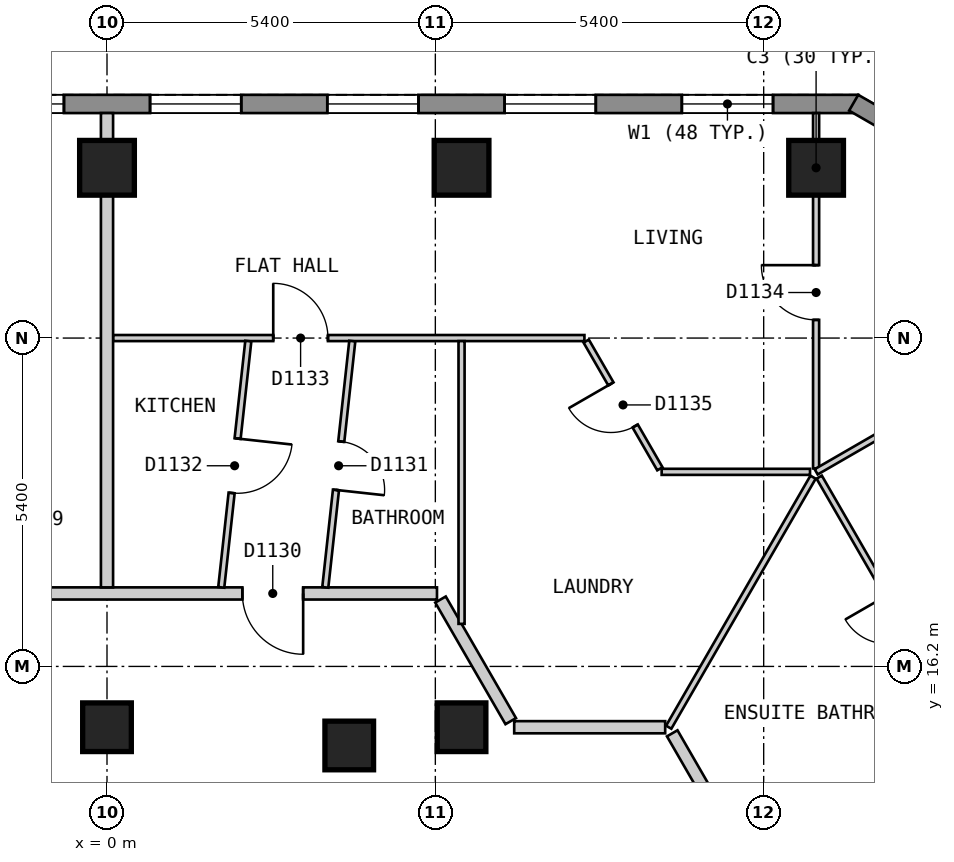
"""IFC4 building model, lengths in metres.
Left out: names, types, materials, properties, quantities, classifications, styles, units other than length and angle.
Written with IfcOpenShell. Run it as: python <this file> out.ifc"""

import sys

from ifc_helpers import new_model, si_unit, direction, frame, frame_2d, origin, origin_2d, place, context, subcontext, project, spatial, polyline, rectangle, outline, extrude, element, fill, save


model = new_model("IFC4")
c1 = context("Model", 3, precision=1e-05, world=origin(), true_north=direction((0.0, 1.0)))
c2 = subcontext(c1, "Body", "Model", "MODEL_VIEW")
j1 = project(units=[si_unit("LENGTHUNIT", "METRE"), si_unit("PLANEANGLEUNIT", "RADIAN")], contexts=[c1])
p1 = place(None, origin())
s1 = spatial("IfcSite", under=j1, at=p1, CompositionType="ELEMENT")
p2 = place(p1, origin())
s2 = spatial("IfcBuilding", under=s1, at=p2, CompositionType="ELEMENT")
p3 = place(p2, frame((0.0, 0.0, 138.6)))
s3 = spatial("IfcBuildingStorey", under=s2, at=p3, CompositionType="ELEMENT", Elevation=138.6)
for number, where, z_axis, x_axis in (
    (1, (11.662, 24.4, 0.0), (0.0, 0.0, 1.0), (-1.0, 0.0, 0.0)),
    (2, (5.831, 24.4, 0.0), (0.0, 0.0, 1.0), (-1.0, 0.0, 0.0)),
    (3, (0.0, 24.4, 0.0), (0.0, 0.0, 1.0), (-1.0, 0.0, 0.0)),
):
    element("IfcColumn", number, at=place(p3, frame(where, z_axis=z_axis, x_axis=x_axis)), inside=s3, PredefinedType="COLUMN", context=c2, shape_type="SweptSolid", body=[
        extrude(rectangle(XDim=0.9, YDim=0.9, at=origin_2d()), origin(), (0.0, 0.0, 1.0), 3.0),
    ])
for number, where, z_axis, x_axis in (
    (4, (5.831, 15.2, 0.0), (0.0, 0.0, 1.0), (-1.0, 0.0, 0.0)),
    (5, (3.984, 14.9, 0.0), (0.0, 0.0, 1.0), (1.0, 0.0, 0.0)),
    (6, (0.0, 15.2, 0.0), (0.0, 0.0, 1.0), (-1.0, 0.0, 0.0)),
):
    element("IfcColumn", number, at=place(p3, frame(where, z_axis=z_axis, x_axis=x_axis)), inside=s3, PredefinedType="COLUMN", context=c2, shape_type="SweptSolid", body=[
        extrude(rectangle(XDim=0.8, YDim=0.8, at=origin_2d()), origin(), (0.0, 0.0, 1.0), 3.0),
    ])
p4 = place(p3, frame((12.355, 25.45, 0.0), z_axis=(0.0, 0.0, 1.0), x_axis=(-1.0, 0.0, 0.0)))
e7 = element("IfcWall", 7, at=p4, inside=s3, PredefinedType="SOLIDWALL", context=c2, shape_type="SweptSolid", body=[
    extrude(outline(polyline([(0.0, -0.15), (24.71, -0.15), (24.63, 0.15), (0.08, 0.15), (0.0, -0.15)])), origin(), (0.0, 0.0, 1.0), 2.7),
])
p5 = place(p4, frame((1.401, 0.0, 0.15)))
e8 = element("IfcOpeningElement", 8, at=p5, cuts=e7, PredefinedType="OPENING", context=c2, shape_type="SweptSolid", body=[
    extrude(rectangle(XDim=1.5, YDim=2.1, at=frame_2d((0.75, 1.05))), frame((0.0, 0.16, 0.0), z_axis=(0.0, -1.0, 0.0), x_axis=(1.0, 0.0, 0.0)), (0.0, 0.0, 1.0), 0.32),
])
p6 = place(p4, frame((4.316, 0.0, 0.15)))
e9 = element("IfcOpeningElement", 9, at=p6, cuts=e7, PredefinedType="OPENING", context=c2, shape_type="SweptSolid", body=[
    extrude(rectangle(XDim=1.5, YDim=2.1, at=frame_2d((0.75, 1.05))), frame((0.0, 0.16, 0.0), z_axis=(0.0, -1.0, 0.0), x_axis=(1.0, 0.0, 0.0)), (0.0, 0.0, 1.0), 0.32),
])
p7 = place(p4, frame((7.232, 0.0, 0.15)))
e10 = element("IfcOpeningElement", 10, at=p7, cuts=e7, PredefinedType="OPENING", context=c2, shape_type="SweptSolid", body=[
    extrude(rectangle(XDim=1.5, YDim=2.1, at=frame_2d((0.75, 1.05))), frame((0.0, 0.16, 0.0), z_axis=(0.0, -1.0, 0.0), x_axis=(1.0, 0.0, 0.0)), (0.0, 0.0, 1.0), 0.32),
])
p8 = place(p4, frame((10.147, 0.0, 0.15)))
e11 = element("IfcOpeningElement", 11, at=p8, cuts=e7, PredefinedType="OPENING", context=c2, shape_type="SweptSolid", body=[
    extrude(rectangle(XDim=1.5, YDim=2.1, at=frame_2d((0.75, 1.05))), frame((0.0, 0.16, 0.0), z_axis=(0.0, -1.0, 0.0), x_axis=(1.0, 0.0, 0.0)), (0.0, 0.0, 1.0), 0.32),
])
p9 = place(p4, frame((13.063, 0.0, 0.15)))
e12 = element("IfcOpeningElement", 12, at=p9, cuts=e7, PredefinedType="OPENING", context=c2, shape_type="SweptSolid", body=[
    extrude(rectangle(XDim=1.5, YDim=2.1, at=frame_2d((0.75, 1.05))), frame((0.0, 0.16, 0.0), z_axis=(0.0, -1.0, 0.0), x_axis=(1.0, 0.0, 0.0)), (0.0, 0.0, 1.0), 0.32),
])
p10 = place(p4, frame((15.978, 0.0, 0.15)))
e13 = element("IfcOpeningElement", 13, at=p10, cuts=e7, PredefinedType="OPENING", context=c2, shape_type="SweptSolid", body=[
    extrude(rectangle(XDim=1.5, YDim=2.1, at=frame_2d((0.75, 1.05))), frame((0.0, 0.16, 0.0), z_axis=(0.0, -1.0, 0.0), x_axis=(1.0, 0.0, 0.0)), (0.0, 0.0, 1.0), 0.32),
])
p11 = place(p4, frame((18.894, 0.0, 0.15)))
e14 = element("IfcOpeningElement", 14, at=p11, cuts=e7, PredefinedType="OPENING", context=c2, shape_type="SweptSolid", body=[
    extrude(rectangle(XDim=1.5, YDim=2.1, at=frame_2d((0.75, 1.05))), frame((0.0, 0.16, 0.0), z_axis=(0.0, -1.0, 0.0), x_axis=(1.0, 0.0, 0.0)), (0.0, 0.0, 1.0), 0.32),
])
p12 = place(p4, frame((21.809, 0.0, 0.15)))
e15 = element("IfcOpeningElement", 15, at=p12, cuts=e7, PredefinedType="OPENING", context=c2, shape_type="SweptSolid", body=[
    extrude(rectangle(XDim=1.5, YDim=2.1, at=frame_2d((0.75, 1.05))), frame((0.0, 0.16, 0.0), z_axis=(0.0, -1.0, 0.0), x_axis=(1.0, 0.0, 0.0)), (0.0, 0.0, 1.0), 0.32),
])
p13 = place(p3, frame((16.61, 22.97, 0.0), z_axis=(0.0, 0.0, 1.0), x_axis=(-0.866022959057, 0.500004234368, 0.0)))
e16 = element("IfcWall", 16, at=p13, inside=s3, PredefinedType="SOLIDWALL", context=c2, shape_type="SweptSolid", body=[
    extrude(outline(polyline([(0.0, -0.15), (5.0, -0.15), (4.92, 0.15), (0.08, 0.15), (0.0, -0.15)])), origin(), (0.0, 0.0, 1.0), 2.7),
])
p14 = place(p13, frame((0.65, 0.0, 0.15)))
e17 = element("IfcOpeningElement", 17, at=p14, cuts=e16, PredefinedType="OPENING", context=c2, shape_type="SweptSolid", body=[
    extrude(rectangle(XDim=1.2, YDim=2.1, at=frame_2d((0.6, 1.05))), frame((0.0, 0.16, 0.0), z_axis=(0.0, -1.0, 0.0), x_axis=(1.0, 0.0, 0.0)), (0.0, 0.0, 1.0), 0.32),
])
p15 = place(p13, frame((3.15, 0.0, 0.15)))
e18 = element("IfcOpeningElement", 18, at=p15, cuts=e16, PredefinedType="OPENING", context=c2, shape_type="SweptSolid", body=[
    extrude(rectangle(XDim=1.2, YDim=2.1, at=frame_2d((0.6, 1.05))), frame((0.0, 0.16, 0.0), z_axis=(0.0, -1.0, 0.0), x_axis=(1.0, 0.0, 0.0)), (0.0, 0.0, 1.0), 0.32),
])
p16 = place(p3, frame((5.485, 17.3, 0.0), z_axis=(0.0, 0.0, 1.0), x_axis=(0.500027479704, -0.866009537788, 0.0)))
e19 = element("IfcWall", 19, at=p16, inside=s3, PredefinedType="PARTITIONING", context=c2, shape_type="SweptSolid", body=[
    extrude(rectangle(XDim=2.309, YDim=0.2, at=frame_2d((1.155, 0.0))), origin(), (0.0, 0.0, 1.0), 2.7),
])
p17 = place(p3, frame((9.296, 15.1, 0.0), z_axis=(0.0, 0.0, 1.0), x_axis=(0.499974024244, -0.866040400375, 0.0)))
e20 = element("IfcWall", 20, at=p17, inside=s3, PredefinedType="PARTITIONING", context=c2, shape_type="SweptSolid", body=[
    extrude(rectangle(XDim=16.857, YDim=0.2, at=frame_2d((8.429, 0.0))), origin(), (0.0, 0.0, 1.0), 2.7),
])
p18 = place(p17, frame((11.522, 0.0, 0.0)))
e21 = element("IfcOpeningElement", 21, at=p18, cuts=e20, PredefinedType="OPENING", context=c2, shape_type="SweptSolid", body=[
    extrude(rectangle(XDim=1.0, YDim=2.1, at=frame_2d((0.5, 1.05))), frame((0.0, 0.11, 0.0), z_axis=(0.0, -1.0, 0.0), x_axis=(1.0, 0.0, 0.0)), (0.0, 0.0, 1.0), 0.22),
])
p19 = place(p3, frame((6.697, 15.2, 0.0), z_axis=(0.0, 0.0, 1.0), x_axis=(1.0, 0.0, 0.0)))
e22 = element("IfcWall", 22, at=p19, inside=s3, PredefinedType="PARTITIONING", context=c2, shape_type="SweptSolid", body=[
    extrude(rectangle(XDim=2.483, YDim=0.2, at=frame_2d((1.241, 0.0))), origin(), (0.0, 0.0, 1.0), 2.7),
])
p20 = place(p3, frame((-5.312, 17.4, 0.0), z_axis=(0.0, 0.0, 1.0), x_axis=(1.0, 0.0, 0.0)))
e23 = element("IfcWall", 23, at=p20, inside=s3, PredefinedType="PARTITIONING", context=c2, shape_type="SweptSolid", body=[
    extrude(rectangle(XDim=10.739, YDim=0.2, at=frame_2d((5.37, 0.0))), origin(), (0.0, 0.0, 1.0), 2.7),
])
p21 = place(p20, frame((7.538, 0.0, 0.0)))
e24 = element("IfcOpeningElement", 24, at=p21, cuts=e23, PredefinedType="OPENING", context=c2, shape_type="SweptSolid", body=[
    extrude(rectangle(XDim=1.0, YDim=2.1, at=frame_2d((0.5, 1.05))), frame((0.0, 0.11, 0.0), z_axis=(0.0, -1.0, 0.0), x_axis=(1.0, 0.0, 0.0)), (0.0, 0.0, 1.0), 0.22),
])
p22 = place(p20, frame((1.864, 0.0, 0.0)))
e25 = element("IfcOpeningElement", 25, at=p22, cuts=e23, PredefinedType="OPENING", context=c2, shape_type="SweptSolid", body=[
    extrude(rectangle(XDim=1.0, YDim=2.1, at=frame_2d((0.5, 1.05))), frame((0.0, 0.11, 0.0), z_axis=(0.0, -1.0, 0.0), x_axis=(1.0, 0.0, 0.0)), (0.0, 0.0, 1.0), 0.22),
])
p23 = place(p3, frame((7.881, 21.55, 0.0), z_axis=(0.0, 0.0, 1.0), x_axis=(0.499821239653, -0.866128586522, 0.0)))
e26 = element("IfcWall", 26, at=p23, inside=s3, PredefinedType="PARTITIONING", context=c2, shape_type="SweptSolid", body=[
    extrude(rectangle(XDim=2.425, YDim=0.1, at=frame_2d((1.212, 0.0))), origin(), (0.0, 0.0, 1.0), 2.7),
])
p24 = place(p23, frame((0.812, 0.0, 0.0)))
e27 = element("IfcOpeningElement", 27, at=p24, cuts=e26, PredefinedType="OPENING", context=c2, shape_type="SweptSolid", body=[
    extrude(rectangle(XDim=0.8, YDim=2.1, at=frame_2d((0.4, 1.05))), frame((0.0, 0.06, 0.0), z_axis=(0.0, -1.0, 0.0), x_axis=(1.0, 0.0, 0.0)), (0.0, 0.0, 1.0), 0.12),
])
p25 = place(p3, frame((11.713, 19.313, 0.0), z_axis=(0.0, 0.0, 1.0), x_axis=(0.499945064984, -0.866057118208, 0.0)))
e28 = element("IfcWall", 28, at=p25, inside=s3, PredefinedType="PARTITIONING", context=c2, shape_type="SweptSolid", body=[
    extrude(rectangle(XDim=5.285, YDim=0.1, at=frame_2d((2.642, 0.0))), origin(), (0.0, 0.0, 1.0), 2.7),
])
p26 = place(p25, frame((2.242, 0.0, 0.0)))
e29 = element("IfcOpeningElement", 29, at=p26, cuts=e28, PredefinedType="OPENING", context=c2, shape_type="SweptSolid", body=[
    extrude(rectangle(XDim=0.8, YDim=2.1, at=frame_2d((0.4, 1.05))), frame((0.0, 0.06, 0.0), z_axis=(0.0, -1.0, 0.0), x_axis=(1.0, 0.0, 0.0)), (0.0, 0.0, 1.0), 0.12),
])
p27 = place(p3, frame((9.122, 19.4, 0.0), z_axis=(0.0, 0.0, 1.0), x_axis=(1.0, 0.0, 0.0)))
e30 = element("IfcWall", 30, at=p27, inside=s3, PredefinedType="PARTITIONING", context=c2, shape_type="SweptSolid", body=[
    extrude(rectangle(XDim=2.44, YDim=0.1, at=frame_2d((1.22, 0.0))), origin(), (0.0, 0.0, 1.0), 2.7),
])
p28 = place(p3, frame((0.1, 21.6, 0.0), z_axis=(0.0, 0.0, 1.0), x_axis=(1.0, 0.0, 0.0)))
e31 = element("IfcWall", 31, at=p28, inside=s3, PredefinedType="PARTITIONING", context=c2, shape_type="SweptSolid", body=[
    extrude(rectangle(XDim=7.752, YDim=0.1, at=frame_2d((3.876, 0.0))), origin(), (0.0, 0.0, 1.0), 2.7),
])
p29 = place(p28, frame((2.634, 0.0, 0.0)))
e32 = element("IfcOpeningElement", 32, at=p29, cuts=e31, PredefinedType="OPENING", context=c2, shape_type="SweptSolid", body=[
    extrude(rectangle(XDim=0.9, YDim=2.1, at=frame_2d((0.45, 1.05))), frame((0.0, 0.06, 0.0), z_axis=(0.0, -1.0, 0.0), x_axis=(1.0, 0.0, 0.0)), (0.0, 0.0, 1.0), 0.12),
])
p30 = place(p3, frame((9.238, 15.2, 0.0), z_axis=(0.0, 0.0, 1.0), x_axis=(0.499988022762, 0.866032318735, 0.0)))
e33 = element("IfcWall", 33, at=p30, inside=s3, PredefinedType="PARTITIONING", context=c2, shape_type="SweptSolid", body=[
    extrude(rectangle(XDim=4.748, YDim=0.1, at=frame_2d((2.374, 0.0))), origin(), (0.0, 0.0, 1.0), 2.7),
])
p31 = place(p3, frame((3.59, 17.5, 0.0), z_axis=(0.0, 0.0, 1.0), x_axis=(0.108938463119, 0.994048495423, 0.0)))
e34 = element("IfcWall", 34, at=p31, inside=s3, PredefinedType="PARTITIONING", context=c2, shape_type="SweptSolid", body=[
    extrude(rectangle(XDim=4.074, YDim=0.1, at=frame_2d((2.037, 0.0))), origin(), (0.0, 0.0, 1.0), 2.7),
])
p32 = place(p31, frame((1.612, 0.0, 0.0)))
e35 = element("IfcOpeningElement", 35, at=p32, cuts=e34, PredefinedType="OPENING", context=c2, shape_type="SweptSolid", body=[
    extrude(rectangle(XDim=0.8, YDim=2.1, at=frame_2d((0.4, 1.05))), frame((0.0, 0.06, 0.0), z_axis=(0.0, -1.0, 0.0), x_axis=(1.0, 0.0, 0.0)), (0.0, 0.0, 1.0), 0.12),
])
p33 = place(p3, frame((1.879, 17.5, 0.0), z_axis=(0.0, 0.0, 1.0), x_axis=(0.10923450369, 0.994016007519, 0.0)))
e36 = element("IfcWall", 36, at=p33, inside=s3, PredefinedType="PARTITIONING", context=c2, shape_type="SweptSolid", body=[
    extrude(rectangle(XDim=4.074, YDim=0.1, at=frame_2d((2.037, 0.0))), origin(), (0.0, 0.0, 1.0), 2.7),
])
p34 = place(p33, frame((1.562, 0.0, 0.0)))
e37 = element("IfcOpeningElement", 37, at=p34, cuts=e36, PredefinedType="OPENING", context=c2, shape_type="SweptSolid", body=[
    extrude(rectangle(XDim=0.9, YDim=2.1, at=frame_2d((0.45, 1.05))), frame((0.0, 0.06, 0.0), z_axis=(0.0, -1.0, 0.0), x_axis=(1.0, 0.0, 0.0)), (0.0, 0.0, 1.0), 0.12),
])
p35 = place(p3, frame((5.831, 16.9, 0.0), z_axis=(0.0, 0.0, 1.0), x_axis=(0.0, 1.0, 0.0)))
e38 = element("IfcWall", 38, at=p35, inside=s3, PredefinedType="PARTITIONING", context=c2, shape_type="SweptSolid", body=[
    extrude(rectangle(XDim=4.65, YDim=0.1, at=frame_2d((2.325, 0.0))), origin(), (0.0, 0.0, 1.0), 2.7),
])
p36 = place(p3, frame((11.662, 19.456, 0.0), z_axis=(0.0, 0.0, 1.0), x_axis=(0.0, 1.0, 0.0)))
e39 = element("IfcWall", 39, at=p36, inside=s3, PredefinedType="PARTITIONING", context=c2, shape_type="SweptSolid", body=[
    extrude(rectangle(XDim=5.844, YDim=0.1, at=frame_2d((2.922, 0.0))), origin(), (0.0, 0.0, 1.0), 2.7),
])
p37 = place(p36, frame((2.443, 0.0, 0.0)))
e40 = element("IfcOpeningElement", 40, at=p37, cuts=e39, PredefinedType="OPENING", context=c2, shape_type="SweptSolid", body=[
    extrude(rectangle(XDim=0.9, YDim=2.1, at=frame_2d((0.45, 1.05))), frame((0.0, 0.06, 0.0), z_axis=(0.0, -1.0, 0.0), x_axis=(1.0, 0.0, 0.0)), (0.0, 0.0, 1.0), 0.12),
])
p38 = place(p3, frame((11.663, 19.4, 0.0), z_axis=(0.0, 0.0, 1.0), x_axis=(0.865941558533, 0.500145196124, 0.0)))
e41 = element("IfcWall", 41, at=p38, inside=s3, PredefinedType="PARTITIONING", context=c2, shape_type="SweptSolid", body=[
    extrude(rectangle(XDim=5.899, YDim=0.1, at=frame_2d((2.949, 0.0))), origin(), (0.0, 0.0, 1.0), 2.7),
])
p39 = place(p38, frame((2.499, 0.0, 0.0)))
e42 = element("IfcOpeningElement", 42, at=p39, cuts=e41, PredefinedType="OPENING", context=c2, shape_type="SweptSolid", body=[
    extrude(rectangle(XDim=0.9, YDim=2.1, at=frame_2d((0.45, 1.05))), frame((0.0, 0.06, 0.0), z_axis=(0.0, -1.0, 0.0), x_axis=(1.0, 0.0, 0.0)), (0.0, 0.0, 1.0), 0.12),
])
p40 = place(p3, frame((0.0, 17.5, 0.0), z_axis=(0.0, 0.0, 1.0), x_axis=(0.0, 1.0, 0.0)))
e43 = element("IfcWall", 43, at=p40, inside=s3, PredefinedType="PARTITIONING", context=c2, shape_type="SweptSolid", body=[
    extrude(rectangle(XDim=7.8, YDim=0.2, at=frame_2d((3.9, 0.0))), origin(), (0.0, 0.0, 1.0), 2.7),
])
p41 = place(p3, frame((10.854, 12.6, 0.0), z_axis=(0.0, 0.0, 1.0), x_axis=(0.866031112038, 0.499990112884, 0.0)))
e44 = element("IfcWall", 44, at=p41, inside=s3, PredefinedType="PARTITIONING", context=c2, shape_type="SweptSolid", body=[
    extrude(rectangle(XDim=3.948, YDim=0.2, at=frame_2d((1.974, 0.0))), origin(), (0.0, 0.0, 1.0), 2.7),
])
p42 = place(p5, origin())
e45 = element("IfcWindow", 45, at=p42, inside=s3, PartitioningType="SINGLE_PANEL", PredefinedType="WINDOW", context=c2, shape_type="SweptSolid", body=[
    extrude(rectangle(XDim=1.5, YDim=2.1, at=frame_2d((0.75, 1.05))), frame((0.0, 0.03, 0.0), z_axis=(0.0, -1.0, 0.0), x_axis=(1.0, 0.0, 0.0)), (0.0, 0.0, 1.0), 0.06),
])
fill(e8, e45)
p43 = place(p6, origin())
e46 = element("IfcWindow", 46, at=p43, inside=s3, PartitioningType="SINGLE_PANEL", PredefinedType="WINDOW", context=c2, shape_type="SweptSolid", body=[
    extrude(rectangle(XDim=1.5, YDim=2.1, at=frame_2d((0.75, 1.05))), frame((0.0, 0.03, 0.0), z_axis=(0.0, -1.0, 0.0), x_axis=(1.0, 0.0, 0.0)), (0.0, 0.0, 1.0), 0.06),
])
fill(e9, e46)
p44 = place(p7, origin())
e47 = element("IfcWindow", 47, at=p44, inside=s3, PartitioningType="SINGLE_PANEL", PredefinedType="WINDOW", context=c2, shape_type="SweptSolid", body=[
    extrude(rectangle(XDim=1.5, YDim=2.1, at=frame_2d((0.75, 1.05))), frame((0.0, 0.03, 0.0), z_axis=(0.0, -1.0, 0.0), x_axis=(1.0, 0.0, 0.0)), (0.0, 0.0, 1.0), 0.06),
])
fill(e10, e47)
p45 = place(p8, origin())
e48 = element("IfcWindow", 48, at=p45, inside=s3, PartitioningType="SINGLE_PANEL", PredefinedType="WINDOW", context=c2, shape_type="SweptSolid", body=[
    extrude(rectangle(XDim=1.5, YDim=2.1, at=frame_2d((0.75, 1.05))), frame((0.0, 0.03, 0.0), z_axis=(0.0, -1.0, 0.0), x_axis=(1.0, 0.0, 0.0)), (0.0, 0.0, 1.0), 0.06),
])
fill(e11, e48)
p46 = place(p9, origin())
e49 = element("IfcWindow", 49, at=p46, inside=s3, PartitioningType="SINGLE_PANEL", PredefinedType="WINDOW", context=c2, shape_type="SweptSolid", body=[
    extrude(rectangle(XDim=1.5, YDim=2.1, at=frame_2d((0.75, 1.05))), frame((0.0, 0.03, 0.0), z_axis=(0.0, -1.0, 0.0), x_axis=(1.0, 0.0, 0.0)), (0.0, 0.0, 1.0), 0.06),
])
fill(e12, e49)
p47 = place(p21, origin())
e50 = element("IfcDoor", 50, at=p47, inside=s3, OperationType="SINGLE_SWING_RIGHT", PredefinedType="DOOR", context=c2, shape_type="SweptSolid", body=[
    extrude(rectangle(XDim=1.0, YDim=2.1, at=frame_2d((0.5, 1.05))), frame((0.0, 0.025, 0.0), z_axis=(0.0, -1.0, 0.0), x_axis=(1.0, 0.0, 0.0)), (0.0, 0.0, 1.0), 0.05),
])
fill(e24, e50)
p48 = place(p32, origin())
e51 = element("IfcDoor", 51, at=p48, inside=s3, OperationType="SINGLE_SWING_LEFT", PredefinedType="DOOR", context=c2, shape_type="SweptSolid", body=[
    extrude(rectangle(XDim=0.8, YDim=2.1, at=frame_2d((0.4, 1.05))), frame((0.0, 0.025, 0.0), z_axis=(0.0, -1.0, 0.0), x_axis=(1.0, 0.0, 0.0)), (0.0, 0.0, 1.0), 0.05),
])
fill(e35, e51)
p49 = place(p34, origin())
e52 = element("IfcDoor", 52, at=p49, inside=s3, OperationType="SINGLE_SWING_RIGHT", PredefinedType="DOOR", context=c2, shape_type="SweptSolid", body=[
    extrude(rectangle(XDim=0.9, YDim=2.1, at=frame_2d((0.45, 1.05))), frame((0.0, 0.025, 0.0), z_axis=(0.0, -1.0, 0.0), x_axis=(1.0, 0.0, 0.0)), (0.0, 0.0, 1.0), 0.05),
])
fill(e37, e52)
p50 = place(p29, origin())
e53 = element("IfcDoor", 53, at=p50, inside=s3, OperationType="SINGLE_SWING_LEFT", PredefinedType="DOOR", context=c2, shape_type="SweptSolid", body=[
    extrude(rectangle(XDim=0.9, YDim=2.1, at=frame_2d((0.45, 1.05))), frame((0.0, 0.025, 0.0), z_axis=(0.0, -1.0, 0.0), x_axis=(1.0, 0.0, 0.0)), (0.0, 0.0, 1.0), 0.05),
])
fill(e32, e53)
p51 = place(p37, origin())
e54 = element("IfcDoor", 54, at=p51, inside=s3, OperationType="SINGLE_SWING_RIGHT", PredefinedType="DOOR", context=c2, shape_type="SweptSolid", body=[
    extrude(rectangle(XDim=0.9, YDim=2.1, at=frame_2d((0.45, 1.05))), frame((0.0, 0.025, 0.0), z_axis=(0.0, -1.0, 0.0), x_axis=(1.0, 0.0, 0.0)), (0.0, 0.0, 1.0), 0.05),
])
fill(e40, e54)
p52 = place(p24, origin())
e55 = element("IfcDoor", 55, at=p52, inside=s3, OperationType="SINGLE_SWING_LEFT", PredefinedType="DOOR", context=c2, shape_type="SweptSolid", body=[
    extrude(rectangle(XDim=0.8, YDim=2.1, at=frame_2d((0.4, 1.05))), frame((0.0, 0.025, 0.0), z_axis=(0.0, -1.0, 0.0), x_axis=(1.0, 0.0, 0.0)), (0.0, 0.0, 1.0), 0.05),
])
fill(e27, e55)
save(model, sys.argv[1])
